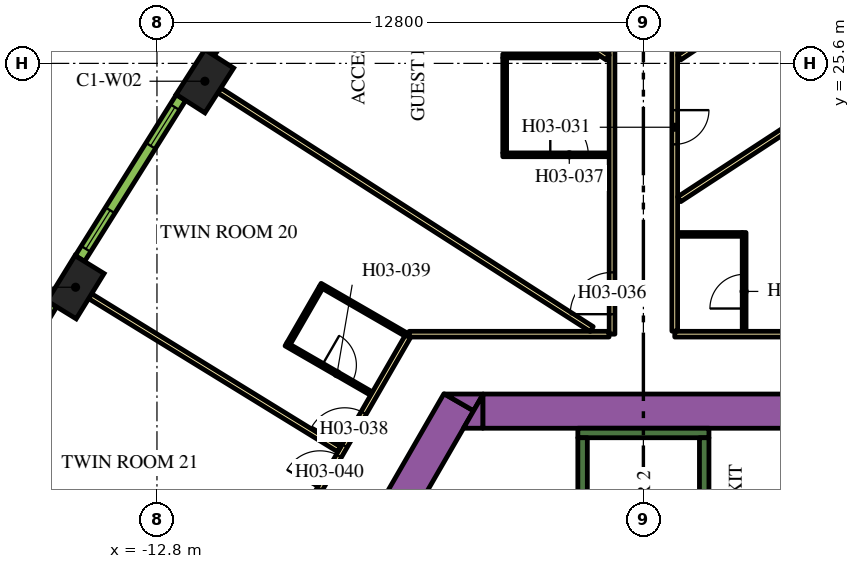
"""IFC4 building model, lengths in metres.
Left out: names, types, materials, properties, quantities, classifications, styles, units other than length and angle.
Written with IfcOpenShell. Run it as: python <this file> out.ifc"""

import sys

from ifc_helpers import new_model, si_unit, direction, frame, frame_2d, origin, origin_2d, place, context, subcontext, project, spatial, polyline, rectangle, outline, extrude, element, fill, save


model = new_model("IFC4")
c1 = context("Model", 3, precision=1e-05, world=origin(), true_north=direction((0.0, 1.0)))
c2 = subcontext(c1, "Body", "Model", "MODEL_VIEW")
j1 = project(units=[si_unit("LENGTHUNIT", "METRE"), si_unit("PLANEANGLEUNIT", "RADIAN")], contexts=[c1])
p1 = place(None, origin())
s1 = spatial("IfcSite", under=j1, at=p1, CompositionType="ELEMENT")
p2 = place(p1, origin())
s2 = spatial("IfcBuilding", under=s1, at=p2, CompositionType="ELEMENT")
p3 = place(p2, frame((0.0, 0.0, 58.8)))
s3 = spatial("IfcBuildingStorey", under=s2, at=p3, CompositionType="ELEMENT", Elevation=58.8)
for number, where, z_axis, x_axis in (
    (1, (-11.539, 25.131, 0.0), (0.0, 0.0, 1.0), (-0.539, -0.842, 0.0)),
    (2, (-14.942, 19.71, 0.0), (0.0, 0.0, 1.0), (-0.524, -0.852, 0.0)),
):
    element("IfcColumn", number, at=place(p3, frame(where, z_axis=z_axis, x_axis=x_axis)), inside=s3, PredefinedType="COLUMN", context=c2, shape_type="SweptSolid", body=[
        extrude(rectangle(XDim=1.4, YDim=0.9, at=origin_2d()), origin(), (0.0, 0.0, 1.0), 3.9),
    ])
p4 = place(p3, frame((-14.268, 0.387, 0.0), z_axis=(0.0, 0.0, 1.0), x_axis=(0.499994617707, 0.866028511231, 0.0)))
e3 = element("IfcWall", 3, at=p4, inside=s3, PredefinedType="SOLIDWALL", context=c2, shape_type="SweptSolid", body=[
    extrude(rectangle(XDim=18.817, YDim=0.9, at=frame_2d((9.409, 0.0))), origin(), (0.0, 0.0, 1.0), 3.9),
])
p5 = place(p3, origin())
e4 = element("IfcWall", 4, at=p5, inside=s3, PredefinedType="SOLIDWALL", context=c2, shape_type="SweptSolid", body=[
    extrude(outline(polyline([(-4.215, 16.9), (-4.469, 16.46), (-5.231, 16.9), (-4.215, 16.9)])), origin(), (0.0, 0.0, 1.0), 3.9),
])
p6 = place(p3, frame((-4.224, 16.45, 0.0), z_axis=(0.0, 0.0, 1.0), x_axis=(1.0, 0.0, 0.0)))
e5 = element("IfcWall", 5, at=p6, inside=s3, PredefinedType="SOLIDWALL", context=c2, shape_type="SweptSolid", body=[
    extrude(rectangle(XDim=9.488, YDim=0.9, at=frame_2d((4.744, 0.0))), origin(), (0.0, 0.0, 1.0), 3.9),
])
e6 = element("IfcWall", 6, at=p5, inside=s3, PredefinedType="SOLIDWALL", context=c2, shape_type="SweptSolid", body=[
    extrude(outline(polyline([(-4.734, 16.0), (-4.226, 16.88), (-4.226, 16.0), (-4.734, 16.0)])), origin(), (0.0, 0.0, 1.0), 3.9),
])
p7 = place(p3, frame((-1.725, 15.875, 0.0), z_axis=(0.0, 0.0, 1.0), x_axis=(1.0, 0.0, 0.0)))
e7 = element("IfcWall", 7, at=p7, inside=s3, PredefinedType="SOLIDWALL", context=c2, shape_type="SweptSolid", body=[
    extrude(rectangle(XDim=3.45, YDim=0.25, at=frame_2d((1.725, 0.0))), origin(), (0.0, 0.0, 1.0), 3.9),
])
p8 = place(p3, frame((1.6, 8.95, 0.0), z_axis=(0.0, 0.0, 1.0), x_axis=(0.0, 1.0, 0.0)))
e8 = element("IfcWall", 8, at=p8, inside=s3, PredefinedType="SOLIDWALL", context=c2, shape_type="SweptSolid", body=[
    extrude(rectangle(XDim=6.8, YDim=0.25, at=frame_2d((3.4, 0.0))), origin(), (0.0, 0.0, 1.0), 3.9),
])
p9 = place(p3, frame((-1.6, 8.7, 0.0), z_axis=(0.0, 0.0, 1.0), x_axis=(0.0, 1.0, 0.0)))
e9 = element("IfcWall", 9, at=p9, inside=s3, PredefinedType="SOLIDWALL", context=c2, shape_type="SweptSolid", body=[
    extrude(rectangle(XDim=7.05, YDim=0.25, at=frame_2d((3.525, 0.0))), origin(), (0.0, 0.0, 1.0), 3.9),
])
p10 = place(p3, frame((0.825, 18.475, 0.0), z_axis=(0.0, 0.0, 1.0), x_axis=(1.0, 0.0, 0.0)))
e10 = element("IfcWall", 10, at=p10, inside=s3, PredefinedType="PARTITIONING", context=c2, shape_type="SweptSolid", body=[
    extrude(rectangle(XDim=5.268, YDim=0.15, at=frame_2d((2.634, 0.0))), origin(), (0.0, 0.0, 1.0), 2.75),
])
p11 = place(p10, frame((4.088, 0.0, 0.0)))
e11 = element("IfcOpeningElement", 11, at=p11, cuts=e10, PredefinedType="OPENING", context=c2, shape_type="SweptSolid", body=[
    extrude(rectangle(XDim=1.0, YDim=2.1, at=frame_2d((0.5, 1.05))), frame((0.0, 0.085, 0.0), z_axis=(0.0, -1.0, 0.0), x_axis=(1.0, 0.0, 0.0)), (0.0, 0.0, 1.0), 0.17),
])
p12 = place(p3, frame((0.825, 34.699, 0.0), z_axis=(0.0, 0.0, 1.0), x_axis=(0.0, -1.0, 0.0)))
e12 = element("IfcWall", 12, at=p12, inside=s3, PredefinedType="PARTITIONING", context=c2, shape_type="SweptSolid", body=[
    extrude(rectangle(XDim=16.144, YDim=0.15, at=frame_2d((8.072, 0.0))), origin(), (0.0, 0.0, 1.0), 2.75),
])
p13 = place(p12, frame((10.329, 0.0, 0.0)))
e13 = element("IfcOpeningElement", 13, at=p13, cuts=e12, PredefinedType="OPENING", context=c2, shape_type="SweptSolid", body=[
    extrude(rectangle(XDim=0.9, YDim=2.1, at=frame_2d((0.45, 1.05))), frame((0.0, 0.085, 0.0), z_axis=(0.0, -1.0, 0.0), x_axis=(1.0, 0.0, 0.0)), (0.0, 0.0, 1.0), 0.17),
])
p14 = place(p12, frame((7.275, 0.0, 0.0)))
e14 = element("IfcOpeningElement", 14, at=p14, cuts=e12, PredefinedType="OPENING", context=c2, shape_type="SweptSolid", body=[
    extrude(rectangle(XDim=1.0, YDim=2.1, at=frame_2d((0.5, 1.05))), frame((0.0, 0.085, 0.0), z_axis=(0.0, -1.0, 0.0), x_axis=(1.0, 0.0, 0.0)), (0.0, 0.0, 1.0), 0.17),
])
p15 = place(p3, frame((-0.825, 18.475, 0.0), z_axis=(0.0, 0.0, 1.0), x_axis=(0.0, 1.0, 0.0)))
e15 = element("IfcWall", 15, at=p15, inside=s3, PredefinedType="PARTITIONING", context=c2, shape_type="SweptSolid", body=[
    extrude(rectangle(XDim=16.224, YDim=0.15, at=frame_2d((8.112, 0.0))), origin(), (0.0, 0.0, 1.0), 2.75),
])
p16 = place(p15, frame((7.949, 0.0, 0.0)))
e16 = element("IfcOpeningElement", 16, at=p16, cuts=e15, PredefinedType="OPENING", context=c2, shape_type="SweptSolid", body=[
    extrude(rectangle(XDim=1.0, YDim=2.1, at=frame_2d((0.5, 1.05))), frame((0.0, 0.085, 0.0), z_axis=(0.0, -1.0, 0.0), x_axis=(1.0, 0.0, 0.0)), (0.0, 0.0, 1.0), 0.17),
])
p17 = place(p15, frame((0.526, 0.0, 0.0)))
e17 = element("IfcOpeningElement", 17, at=p17, cuts=e15, PredefinedType="OPENING", context=c2, shape_type="SweptSolid", body=[
    extrude(rectangle(XDim=1.1, YDim=2.1, at=frame_2d((0.55, 1.05))), frame((0.0, 0.085, 0.0), z_axis=(0.0, -1.0, 0.0), x_axis=(1.0, 0.0, 0.0)), (0.0, 0.0, 1.0), 0.17),
])
p18 = place(p3, frame((-6.163, 18.475, 0.0), z_axis=(0.0, 0.0, 1.0), x_axis=(1.0, 0.0, 0.0)))
e18 = element("IfcWall", 18, at=p18, inside=s3, PredefinedType="PARTITIONING", context=c2, shape_type="SweptSolid", body=[
    extrude(rectangle(XDim=5.258, YDim=0.15, at=frame_2d((2.629, 0.0))), origin(), (0.0, 0.0, 1.0), 2.75),
])
p19 = place(p3, frame((-19.081, -3.9, 0.0), z_axis=(0.0, 0.0, 1.0), x_axis=(0.499998313975, 0.866026377209, 0.0)))
e19 = element("IfcWall", 19, at=p19, inside=s3, PredefinedType="PARTITIONING", context=c2, shape_type="SweptSolid", body=[
    extrude(rectangle(XDim=25.766, YDim=0.15, at=frame_2d((12.883, 0.0))), origin(), (0.0, 0.0, 1.0), 2.75),
])
p20 = place(p19, frame((22.445, 0.0, 0.0)))
e20 = element("IfcOpeningElement", 20, at=p20, cuts=e19, PredefinedType="OPENING", context=c2, shape_type="SweptSolid", body=[
    extrude(rectangle(XDim=1.0, YDim=2.1, at=frame_2d((0.5, 1.05))), frame((0.0, 0.085, 0.0), z_axis=(0.0, -1.0, 0.0), x_axis=(1.0, 0.0, 0.0)), (0.0, 0.0, 1.0), 0.17),
])
p21 = place(p19, frame((21.138, 0.0, 0.0)))
e21 = element("IfcOpeningElement", 21, at=p21, cuts=e19, PredefinedType="OPENING", context=c2, shape_type="SweptSolid", body=[
    extrude(rectangle(XDim=1.0, YDim=2.1, at=frame_2d((0.5, 1.05))), frame((0.0, 0.085, 0.0), z_axis=(0.0, -1.0, 0.0), x_axis=(1.0, 0.0, 0.0)), (0.0, 0.0, 1.0), 0.17),
])
p22 = place(p19, frame((14.066, 0.0, 0.0)))
e22 = element("IfcOpeningElement", 22, at=p22, cuts=e19, PredefinedType="OPENING", context=c2, shape_type="SweptSolid", body=[
    extrude(rectangle(XDim=0.9, YDim=2.1, at=frame_2d((0.45, 1.05))), frame((0.0, 0.085, 0.0), z_axis=(0.0, -1.0, 0.0), x_axis=(1.0, 0.0, 0.0)), (0.0, 0.0, 1.0), 0.17),
])
p23 = place(p19, frame((11.693, 0.0, 0.0)))
e23 = element("IfcOpeningElement", 23, at=p23, cuts=e19, PredefinedType="OPENING", context=c2, shape_type="SweptSolid", body=[
    extrude(rectangle(XDim=1.0, YDim=2.1, at=frame_2d((0.5, 1.05))), frame((0.0, 0.085, 0.0), z_axis=(0.0, -1.0, 0.0), x_axis=(1.0, 0.0, 0.0)), (0.0, 0.0, 1.0), 0.17),
])
p24 = place(p3, frame((-14.558, 19.475, 0.0), z_axis=(0.0, 0.0, 1.0), x_axis=(0.851829455142, -0.523819223925, 0.0)))
e24 = element("IfcWall", 24, at=p24, inside=s3, PredefinedType="PARTITIONING", context=c2, shape_type="SweptSolid", body=[
    extrude(rectangle(XDim=7.688, YDim=0.15, at=frame_2d((3.844, 0.0))), origin(), (0.0, 0.0, 1.0), 2.75),
])
p25 = place(p3, frame((-11.16, 24.888, 0.0), z_axis=(0.0, 0.0, 1.0), x_axis=(0.84199813156, -0.539480441211, 0.0)))
e25 = element("IfcWall", 25, at=p25, inside=s3, PredefinedType="PARTITIONING", context=c2, shape_type="SweptSolid", body=[
    extrude(rectangle(XDim=11.638, YDim=0.15, at=frame_2d((5.819, 0.0))), origin(), (0.0, 0.0, 1.0), 2.75),
])
p26 = place(p3, frame((-7.662, 30.238, 0.0), z_axis=(0.0, 0.0, 1.0), x_axis=(0.831882886825, -0.554951225431, 0.0)))
e26 = element("IfcWall", 26, at=p26, inside=s3, PredefinedType="PARTITIONING", context=c2, shape_type="SweptSolid", body=[
    extrude(rectangle(XDim=8.079, YDim=0.15, at=frame_2d((4.04, 0.0))), origin(), (0.0, 0.0, 1.0), 2.75),
])
p27 = place(p3, frame((9.922, 27.896, 0.0), z_axis=(0.0, 0.0, 1.0), x_axis=(-0.836970816595, -0.547247523675, 0.0)))
e27 = element("IfcWall", 27, at=p27, inside=s3, PredefinedType="PARTITIONING", context=c2, shape_type="SweptSolid", body=[
    extrude(rectangle(XDim=10.729, YDim=0.15, at=frame_2d((5.364, 0.0))), origin(), (0.0, 0.0, 1.0), 2.75),
])
p28 = place(p3, frame((7.662, 30.238, 0.0), z_axis=(0.0, 0.0, 1.0), x_axis=(-0.831882886825, -0.554951225431, 0.0)))
e28 = element("IfcWall", 28, at=p28, inside=s3, PredefinedType="PARTITIONING", context=c2, shape_type="SweptSolid", body=[
    extrude(rectangle(XDim=8.079, YDim=0.15, at=frame_2d((4.04, 0.0))), origin(), (0.0, 0.0, 1.0), 2.75),
])
p29 = place(p3, frame((2.651, 18.55, 0.0), z_axis=(0.0, 0.0, 1.0), x_axis=(0.0, 1.0, 0.0)))
e29 = element("IfcWall", 29, at=p29, inside=s3, PredefinedType="PARTITIONING", context=c2, shape_type="SweptSolid", body=[
    extrude(rectangle(XDim=2.6, YDim=0.1, at=frame_2d((1.3, 0.0))), origin(), (0.0, 0.0, 1.0), 2.75),
])
p30 = place(p29, frame((0.6, 0.0, 0.0)))
e30 = element("IfcOpeningElement", 30, at=p30, cuts=e29, PredefinedType="OPENING", context=c2, shape_type="SweptSolid", body=[
    extrude(rectangle(XDim=0.9, YDim=2.1, at=frame_2d((0.45, 1.05))), frame((0.0, 0.06, 0.0), z_axis=(0.0, -1.0, 0.0), x_axis=(1.0, 0.0, 0.0)), (0.0, 0.0, 1.0), 0.12),
])
p31 = place(p3, frame((2.601, 21.1, 0.0), z_axis=(0.0, 0.0, 1.0), x_axis=(-1.0, 0.0, 0.0)))
e31 = element("IfcWall", 31, at=p31, inside=s3, PredefinedType="PARTITIONING", context=c2, shape_type="SweptSolid", body=[
    extrude(rectangle(XDim=1.7, YDim=0.1, at=frame_2d((0.85, 0.0))), origin(), (0.0, 0.0, 1.0), 2.75),
])
p32 = place(p3, frame((-3.7, 23.195, 0.0), z_axis=(0.0, 0.0, 1.0), x_axis=(1.0, 0.0, 0.0)))
e32 = element("IfcWall", 32, at=p32, inside=s3, PredefinedType="PARTITIONING", context=c2, shape_type="SweptSolid", body=[
    extrude(rectangle(XDim=2.8, YDim=0.1, at=frame_2d((1.4, 0.0))), origin(), (0.0, 0.0, 1.0), 2.75),
])
p33 = place(p32, frame((1.25, 0.0, 0.0)))
e33 = element("IfcOpeningElement", 33, at=p33, cuts=e32, PredefinedType="OPENING", context=c2, shape_type="SweptSolid", body=[
    extrude(rectangle(XDim=1.0, YDim=2.1, at=frame_2d((0.5, 1.05))), frame((0.0, 0.06, 0.0), z_axis=(0.0, -1.0, 0.0), x_axis=(1.0, 0.0, 0.0)), (0.0, 0.0, 1.0), 0.12),
])
p34 = place(p3, frame((-3.65, 23.245, 0.0), z_axis=(0.0, 0.0, 1.0), x_axis=(0.0, 1.0, 0.0)))
e34 = element("IfcWall", 34, at=p34, inside=s3, PredefinedType="PARTITIONING", context=c2, shape_type="SweptSolid", body=[
    extrude(rectangle(XDim=2.5, YDim=0.1, at=frame_2d((1.25, 0.0))), origin(), (0.0, 0.0, 1.0), 2.75),
])
p35 = place(p3, frame((-1.21, 25.795, 0.0), z_axis=(0.0, 0.0, 1.0), x_axis=(-1.0, 0.0, 0.0)))
e35 = element("IfcWall", 35, at=p35, inside=s3, PredefinedType="PARTITIONING", context=c2, shape_type="SweptSolid", body=[
    extrude(rectangle(XDim=2.49, YDim=0.1, at=frame_2d((1.245, 0.0))), origin(), (0.0, 0.0, 1.0), 2.75),
])
p36 = place(p3, frame((-9.405, 18.21, 0.0), z_axis=(0.0, 0.0, 1.0), x_axis=(0.865997922154, -0.500047596559, 0.0)))
e36 = element("IfcWall", 36, at=p36, inside=s3, PredefinedType="PARTITIONING", context=c2, shape_type="SweptSolid", body=[
    extrude(rectangle(XDim=2.6, YDim=0.1, at=frame_2d((1.3, 0.0))), origin(), (0.0, 0.0, 1.0), 2.75),
])
p37 = place(p36, frame((1.1, 0.0, 0.0)))
e37 = element("IfcOpeningElement", 37, at=p37, cuts=e36, PredefinedType="OPENING", context=c2, shape_type="SweptSolid", body=[
    extrude(rectangle(XDim=0.9, YDim=2.1, at=frame_2d((0.45, 1.05))), frame((0.0, 0.06, 0.0), z_axis=(0.0, -1.0, 0.0), x_axis=(1.0, 0.0, 0.0)), (0.0, 0.0, 1.0), 0.12),
])
p38 = place(p3, frame((-9.336, 18.229, 0.0), z_axis=(0.0, 0.0, 1.0), x_axis=(0.499954529098, 0.86605165483, 0.0)))
e38 = element("IfcWall", 38, at=p38, inside=s3, PredefinedType="PARTITIONING", context=c2, shape_type="SweptSolid", body=[
    extrude(rectangle(XDim=1.7, YDim=0.1, at=frame_2d((0.85, 0.0))), origin(), (0.0, 0.0, 1.0), 2.75),
])
p39 = place(p3, frame((-6.253, 18.469, 0.0), z_axis=(0.0, 0.0, 1.0), x_axis=(-0.866021400173, 0.500006934395, 0.0)))
e39 = element("IfcWall", 39, at=p39, inside=s3, PredefinedType="PARTITIONING", context=c2, shape_type="SweptSolid", body=[
    extrude(rectangle(XDim=2.6, YDim=0.1, at=frame_2d((1.3, 0.0))), origin(), (0.0, 0.0, 1.0), 2.75),
])
p40 = place(p3, frame((-8.676, 30.068, 0.0), z_axis=(0.0, 0.0, 1.0), x_axis=(-0.547204617628, -0.836998868845, 0.0)))
e40 = element("IfcWall", 40, at=p40, inside=s3, PredefinedType="SOLIDWALL", context=c2, shape_type="SweptSolid", body=[
    extrude(rectangle(XDim=4.998, YDim=0.29, at=frame_2d((2.499, 0.0))), origin(), (0.0, 0.0, 1.0), 3.65),
])
p41 = place(p40, frame((0.297, 0.0, 0.9)))
e41 = element("IfcOpeningElement", 41, at=p41, cuts=e40, PredefinedType="OPENING", context=c2, shape_type="SweptSolid", body=[
    extrude(rectangle(XDim=1.2, YDim=2.15, at=frame_2d((0.6, 1.075))), frame((0.0, 0.155, 0.0), z_axis=(0.0, -1.0, 0.0), x_axis=(1.0, 0.0, 0.0)), (0.0, 0.0, 1.0), 0.31),
])
p42 = place(p40, frame((3.501, 0.0, 0.9)))
e42 = element("IfcOpeningElement", 42, at=p42, cuts=e40, PredefinedType="OPENING", context=c2, shape_type="SweptSolid", body=[
    extrude(rectangle(XDim=1.2, YDim=2.15, at=frame_2d((0.6, 1.075))), frame((0.0, 0.155, 0.0), z_axis=(0.0, -1.0, 0.0), x_axis=(1.0, 0.0, 0.0)), (0.0, 0.0, 1.0), 0.31),
])
p43 = place(p3, frame((-12.17, 24.699, 0.0), z_axis=(0.0, 0.0, 1.0), x_axis=(-0.531688286542, -0.846940119462, 0.0)))
e43 = element("IfcWall", 43, at=p43, inside=s3, PredefinedType="SOLIDWALL", context=c2, shape_type="SweptSolid", body=[
    extrude(rectangle(XDim=4.998, YDim=0.29, at=frame_2d((2.499, 0.0))), origin(), (0.0, 0.0, 1.0), 3.65),
])
p44 = place(p43, frame((0.297, 0.0, 0.9)))
e44 = element("IfcOpeningElement", 44, at=p44, cuts=e43, PredefinedType="OPENING", context=c2, shape_type="SweptSolid", body=[
    extrude(rectangle(XDim=1.2, YDim=2.15, at=frame_2d((0.6, 1.075))), frame((0.0, 0.155, 0.0), z_axis=(0.0, -1.0, 0.0), x_axis=(1.0, 0.0, 0.0)), (0.0, 0.0, 1.0), 0.31),
])
p45 = place(p43, frame((3.501, 0.0, 0.9)))
e45 = element("IfcOpeningElement", 45, at=p45, cuts=e43, PredefinedType="OPENING", context=c2, shape_type="SweptSolid", body=[
    extrude(rectangle(XDim=1.2, YDim=2.15, at=frame_2d((0.6, 1.075))), frame((0.0, 0.155, 0.0), z_axis=(0.0, -1.0, 0.0), x_axis=(1.0, 0.0, 0.0)), (0.0, 0.0, 1.0), 0.31),
])
p46 = place(p3, frame((-15.564, 19.267, 0.0), z_axis=(0.0, 0.0, 1.0), x_axis=(-0.515938796285, -0.856625448191, 0.0)))
e46 = element("IfcWall", 46, at=p46, inside=s3, PredefinedType="SOLIDWALL", context=c2, shape_type="SweptSolid", body=[
    extrude(rectangle(XDim=4.998, YDim=0.29, at=frame_2d((2.499, 0.0))), origin(), (0.0, 0.0, 1.0), 3.65),
])
p47 = place(p46, frame((0.297, 0.0, 0.9)))
e47 = element("IfcOpeningElement", 47, at=p47, cuts=e46, PredefinedType="OPENING", context=c2, shape_type="SweptSolid", body=[
    extrude(rectangle(XDim=1.2, YDim=2.15, at=frame_2d((0.6, 1.075))), frame((0.0, 0.155, 0.0), z_axis=(0.0, -1.0, 0.0), x_axis=(1.0, 0.0, 0.0)), (0.0, 0.0, 1.0), 0.31),
])
p48 = place(p46, frame((3.501, 0.0, 0.9)))
e48 = element("IfcOpeningElement", 48, at=p48, cuts=e46, PredefinedType="OPENING", context=c2, shape_type="SweptSolid", body=[
    extrude(rectangle(XDim=1.2, YDim=2.15, at=frame_2d((0.6, 1.075))), frame((0.0, 0.155, 0.0), z_axis=(0.0, -1.0, 0.0), x_axis=(1.0, 0.0, 0.0)), (0.0, 0.0, 1.0), 0.31),
])
p49 = place(p30, origin())
e49 = element("IfcDoor", 49, at=p49, inside=s3, OperationType="SINGLE_SWING_RIGHT", PredefinedType="DOOR", context=c2, shape_type="SweptSolid", body=[
    extrude(rectangle(XDim=0.9, YDim=2.1, at=frame_2d((0.45, 1.05))), frame((0.0, 0.025, 0.0), z_axis=(0.0, -1.0, 0.0), x_axis=(1.0, 0.0, 0.0)), (0.0, 0.0, 1.0), 0.05),
])
fill(e30, e49)
p50 = place(p13, origin())
e50 = element("IfcDoor", 50, at=p50, inside=s3, OperationType="SINGLE_SWING_RIGHT", PredefinedType="DOOR", context=c2, shape_type="SweptSolid", body=[
    extrude(rectangle(XDim=0.9, YDim=2.1, at=frame_2d((0.45, 1.05))), frame((0.0, 0.025, 0.0), z_axis=(0.0, -1.0, 0.0), x_axis=(1.0, 0.0, 0.0)), (0.0, 0.0, 1.0), 0.05),
])
fill(e13, e50)
p51 = place(p17, origin())
e51 = element("IfcDoor", 51, at=p51, inside=s3, OperationType="SINGLE_SWING_LEFT", PredefinedType="DOOR", context=c2, shape_type="SweptSolid", body=[
    extrude(rectangle(XDim=1.1, YDim=2.1, at=frame_2d((0.55, 1.05))), frame((0.0, 0.025, 0.0), z_axis=(0.0, -1.0, 0.0), x_axis=(1.0, 0.0, 0.0)), (0.0, 0.0, 1.0), 0.05),
])
fill(e17, e51)
p52 = place(p33, origin())
e52 = element("IfcDoor", 52, at=p52, inside=s3, OperationType="SINGLE_SWING_LEFT", PredefinedType="DOOR", context=c2, shape_type="SweptSolid", body=[
    extrude(rectangle(XDim=1.0, YDim=2.1, at=frame_2d((0.5, 1.05))), frame((0.0, 0.025, 0.0), z_axis=(0.0, -1.0, 0.0), x_axis=(1.0, 0.0, 0.0)), (0.0, 0.0, 1.0), 0.05),
])
fill(e33, e52)
p53 = place(p20, origin())
e53 = element("IfcDoor", 53, at=p53, inside=s3, OperationType="SINGLE_SWING_LEFT", PredefinedType="DOOR", context=c2, shape_type="SweptSolid", body=[
    extrude(rectangle(XDim=1.0, YDim=2.1, at=frame_2d((0.5, 1.05))), frame((0.0, 0.025, 0.0), z_axis=(0.0, -1.0, 0.0), x_axis=(1.0, 0.0, 0.0)), (0.0, 0.0, 1.0), 0.05),
])
fill(e20, e53)
p54 = place(p37, origin())
e54 = element("IfcDoor", 54, at=p54, inside=s3, OperationType="SINGLE_SWING_LEFT", PredefinedType="DOOR", context=c2, shape_type="SweptSolid", body=[
    extrude(rectangle(XDim=0.9, YDim=2.1, at=frame_2d((0.45, 1.05))), frame((0.0, 0.025, 0.0), z_axis=(0.0, -1.0, 0.0), x_axis=(1.0, 0.0, 0.0)), (0.0, 0.0, 1.0), 0.05),
])
fill(e37, e54)
p55 = place(p21, origin())
e55 = element("IfcDoor", 55, at=p55, inside=s3, OperationType="SINGLE_SWING_RIGHT", PredefinedType="DOOR", context=c2, shape_type="SweptSolid", body=[
    extrude(rectangle(XDim=1.0, YDim=2.1, at=frame_2d((0.5, 1.05))), frame((0.0, 0.025, 0.0), z_axis=(0.0, -1.0, 0.0), x_axis=(1.0, 0.0, 0.0)), (0.0, 0.0, 1.0), 0.05),
])
fill(e21, e55)
p56 = place(p44, origin())
e56 = element("IfcWindow", 56, at=p56, inside=s3, PartitioningType="DOUBLE_PANEL_VERTICAL", PredefinedType="WINDOW", context=c2, shape_type="SweptSolid", body=[
    extrude(rectangle(XDim=1.2, YDim=2.15, at=frame_2d((0.6, 1.075))), frame((0.0, 0.015, 0.0), z_axis=(0.0, -1.0, 0.0), x_axis=(1.0, 0.0, 0.0)), (0.0, 0.0, 1.0), 0.06),
])
fill(e44, e56)
p57 = place(p45, origin())
e57 = element("IfcWindow", 57, at=p57, inside=s3, PartitioningType="DOUBLE_PANEL_VERTICAL", PredefinedType="WINDOW", context=c2, shape_type="SweptSolid", body=[
    extrude(rectangle(XDim=1.2, YDim=2.15, at=frame_2d((0.6, 1.075))), frame((0.0, 0.015, 0.0), z_axis=(0.0, -1.0, 0.0), x_axis=(1.0, 0.0, 0.0)), (0.0, 0.0, 1.0), 0.06),
])
fill(e45, e57)
save(model, sys.argv[1])
